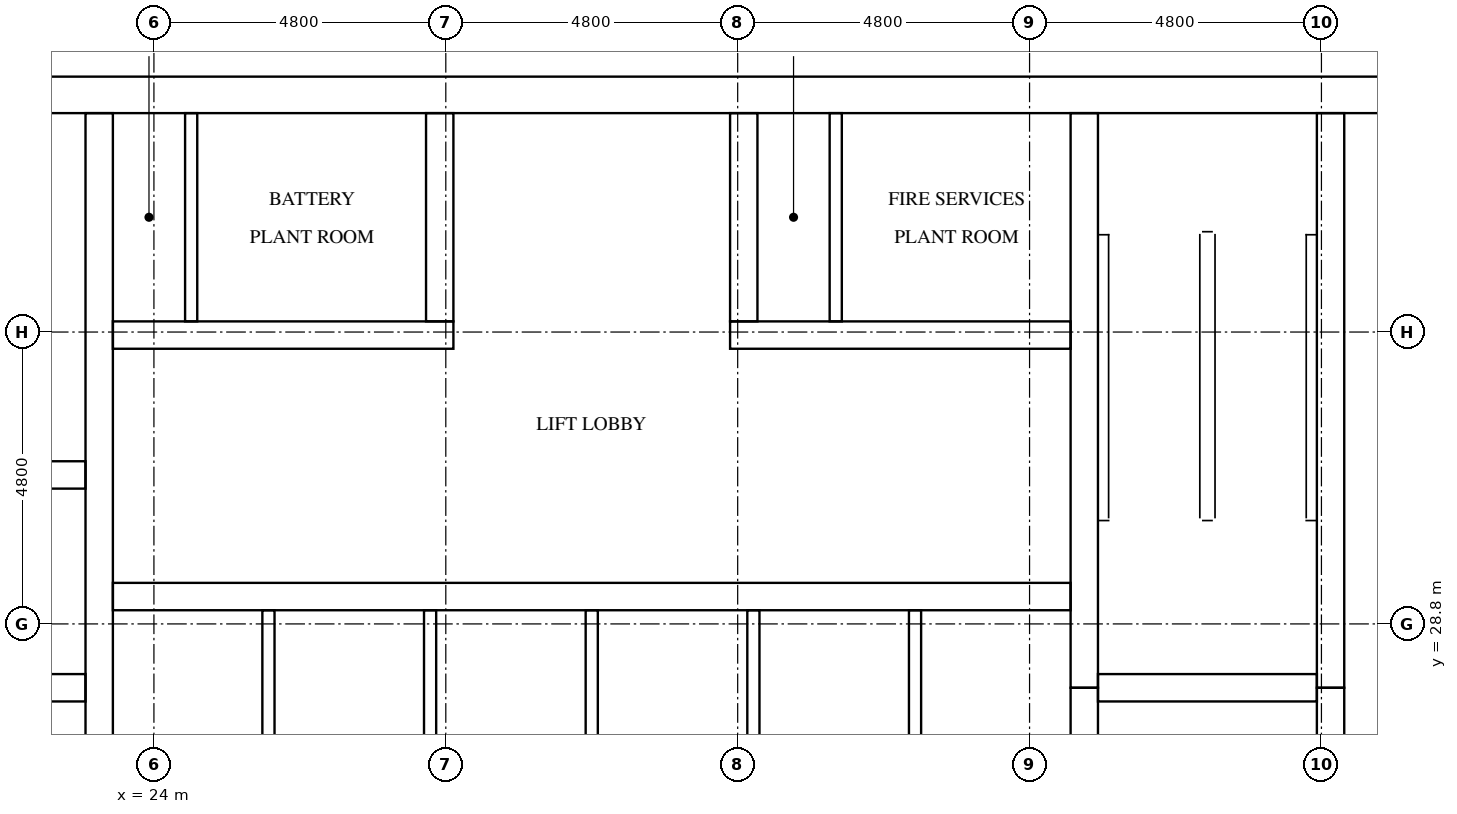
"""IFC4 building model, lengths in metres.
Left out: names, types, materials, properties, quantities, classifications, styles, units other than length and angle.
Written with IfcOpenShell. Run it as: python <this file> out.ifc"""

import sys

from ifc_helpers import new_model, si_unit, direction, frame, frame_2d, origin, place, context, subcontext, project, spatial, rectangle, extrude, element, fill, save


model = new_model("IFC4")
c1 = context("Model", 3, precision=1e-05, world=origin(), true_north=direction((0.0, 1.0)))
c2 = subcontext(c1, "Body", "Model", "MODEL_VIEW")
j1 = project(units=[si_unit("LENGTHUNIT", "METRE"), si_unit("PLANEANGLEUNIT", "RADIAN")], contexts=[c1])
p1 = place(None, origin())
s1 = spatial("IfcSite", under=j1, at=p1, CompositionType="ELEMENT")
p2 = place(p1, origin())
s2 = spatial("IfcBuilding", under=s1, at=p2, CompositionType="ELEMENT")
p3 = place(p2, frame((0.0, 0.0, 233.3)))
s3 = spatial("IfcBuildingStorey", under=s2, at=p3, CompositionType="ELEMENT", Elevation=233.3)
p4 = place(p3, frame((15.0, 37.5, 0.0), z_axis=(0.0, 0.0, 1.0), x_axis=(1.0, 0.0, 0.0)))
e1 = element("IfcWall", 1, at=p4, inside=s3, PredefinedType="SHEAR", context=c2, shape_type="SweptSolid", body=[
    extrude(rectangle(XDim=32.4, YDim=0.6, at=frame_2d((16.2, 0.0))), origin(), (0.0, 0.0, 1.0), 5.1),
])
p5 = place(p4, frame((15.3, 0.0, 0.0)))
e2 = element("IfcOpeningElement", 2, at=p5, cuts=e1, PredefinedType="OPENING", context=c2, shape_type="SweptSolid", body=[
    extrude(rectangle(XDim=1.8, YDim=2.1, at=frame_2d((0.9, 1.05))), frame((0.0, 0.31, 0.0), z_axis=(0.0, -1.0, 0.0), x_axis=(1.0, 0.0, 0.0)), (0.0, 0.0, 1.0), 0.62),
])
p6 = place(p4, frame((1.25, 0.0, 0.0)))
e3 = element("IfcOpeningElement", 3, at=p6, cuts=e1, PredefinedType="OPENING", context=c2, shape_type="SweptSolid", body=[
    extrude(rectangle(XDim=1.0, YDim=2.1, at=frame_2d((0.5, 1.05))), frame((0.0, 0.31, 0.0), z_axis=(0.0, -1.0, 0.0), x_axis=(1.0, 0.0, 0.0)), (0.0, 0.0, 1.0), 0.62),
])
p7 = place(p4, frame((4.988, 0.0, 0.0)))
e4 = element("IfcOpeningElement", 4, at=p7, cuts=e1, PredefinedType="OPENING", context=c2, shape_type="SweptSolid", body=[
    extrude(rectangle(XDim=1.0, YDim=2.1, at=frame_2d((0.5, 1.05))), frame((0.0, 0.31, 0.0), z_axis=(0.0, -1.0, 0.0), x_axis=(1.0, 0.0, 0.0)), (0.0, 0.0, 1.0), 0.62),
])
p8 = place(p3, frame((23.1, 15.6, 0.0), z_axis=(0.0, 0.0, 1.0), x_axis=(0.0, 1.0, 0.0)))
e5 = element("IfcWall", 5, at=p8, inside=s3, PredefinedType="SHEAR", context=c2, shape_type="SweptSolid", body=[
    extrude(rectangle(XDim=21.6, YDim=0.45, at=frame_2d((10.8, 0.0))), origin(), (0.0, 0.0, 1.0), 5.1),
])
p9 = place(p3, frame((39.3, 24.25, 0.0), z_axis=(0.0, 0.0, 1.0), x_axis=(0.0, 1.0, 0.0)))
e6 = element("IfcWall", 6, at=p9, inside=s3, PredefinedType="SHEAR", context=c2, shape_type="SweptSolid", body=[
    extrude(rectangle(XDim=3.5, YDim=0.45, at=frame_2d((1.75, 0.0))), origin(), (0.0, 0.0, 1.0), 5.1),
])
p10 = place(p3, frame((39.3, 27.75, 0.0), z_axis=(0.0, 0.0, 1.0), x_axis=(0.0, 1.0, 0.0)))
e7 = element("IfcWall", 7, at=p10, inside=s3, PredefinedType="SHEAR", context=c2, shape_type="SweptSolid", body=[
    extrude(rectangle(XDim=9.45, YDim=0.45, at=frame_2d((4.725, 0.0))), origin(), (0.0, 0.0, 1.0), 5.1),
])
p11 = place(p3, frame((43.35, 24.25, 0.0), z_axis=(0.0, 0.0, 1.0), x_axis=(0.0, 1.0, 0.0)))
e8 = element("IfcWall", 8, at=p11, inside=s3, PredefinedType="SHEAR", context=c2, shape_type="SweptSolid", body=[
    extrude(rectangle(XDim=3.5, YDim=0.45, at=frame_2d((1.75, 0.0))), origin(), (0.0, 0.0, 1.0), 5.1),
])
p12 = place(p11, frame((1.2, 0.0, 0.0)))
e9 = element("IfcOpeningElement", 9, at=p12, cuts=e8, PredefinedType="OPENING", context=c2, shape_type="SweptSolid", body=[
    extrude(rectangle(XDim=1.1, YDim=2.1, at=frame_2d((0.55, 1.05))), frame((0.0, 0.235, 0.0), z_axis=(0.0, -1.0, 0.0), x_axis=(1.0, 0.0, 0.0)), (0.0, 0.0, 1.0), 0.47),
])
p13 = place(p3, frame((43.35, 27.75, 0.0), z_axis=(0.0, 0.0, 1.0), x_axis=(0.0, 1.0, 0.0)))
e10 = element("IfcWall", 10, at=p13, inside=s3, PredefinedType="SHEAR", context=c2, shape_type="SweptSolid", body=[
    extrude(rectangle(XDim=9.45, YDim=0.45, at=frame_2d((4.725, 0.0))), origin(), (0.0, 0.0, 1.0), 5.1),
])
p14 = place(p13, frame((7.65, 0.0, 0.0)))
e11 = element("IfcOpeningElement", 11, at=p14, cuts=e10, PredefinedType="OPENING", context=c2, shape_type="SweptSolid", body=[
    extrude(rectangle(XDim=1.2, YDim=2.1, at=frame_2d((0.6, 1.05))), frame((0.0, 0.235, 0.0), z_axis=(0.0, -1.0, 0.0), x_axis=(1.0, 0.0, 0.0)), (0.0, 0.0, 1.0), 0.47),
])
p15 = place(p3, frame((19.275, 27.75, 0.0), z_axis=(0.0, 0.0, 1.0), x_axis=(1.0, 0.0, 0.0)))
e12 = element("IfcWall", 12, at=p15, inside=s3, PredefinedType="SHEAR", context=c2, shape_type="SweptSolid", body=[
    extrude(rectangle(XDim=3.6, YDim=0.45, at=frame_2d((1.8, 0.0))), origin(), (0.0, 0.0, 1.0), 5.1),
])
p16 = place(p3, frame((15.6, 31.25, 0.0), z_axis=(0.0, 0.0, 1.0), x_axis=(1.0, 0.0, 0.0)))
e13 = element("IfcWall", 13, at=p16, inside=s3, PredefinedType="SHEAR", context=c2, shape_type="SweptSolid", body=[
    extrude(rectangle(XDim=7.275, YDim=0.45, at=frame_2d((3.637, 0.0))), origin(), (0.0, 0.0, 1.0), 5.1),
])
p17 = place(p3, frame((39.525, 27.75, 0.0), z_axis=(0.0, 0.0, 1.0), x_axis=(1.0, 0.0, 0.0)))
e14 = element("IfcWall", 14, at=p17, inside=s3, PredefinedType="SHEAR", context=c2, shape_type="SweptSolid", body=[
    extrude(rectangle(XDim=3.6, YDim=0.45, at=frame_2d((1.8, 0.0))), origin(), (0.0, 0.0, 1.0), 5.1),
])
p18 = place(p3, frame((23.325, 29.25, 0.0), z_axis=(0.0, 0.0, 1.0), x_axis=(1.0, 0.0, 0.0)))
e15 = element("IfcWall", 15, at=p18, inside=s3, PredefinedType="SHEAR", context=c2, shape_type="SweptSolid", body=[
    extrude(rectangle(XDim=15.75, YDim=0.45, at=frame_2d((7.875, 0.0))), origin(), (0.0, 0.0, 1.0), 5.1),
])
p19 = place(p18, frame((0.679, 0.0, 0.0)))
e16 = element("IfcOpeningElement", 16, at=p19, cuts=e15, PredefinedType="OPENING", context=c2, shape_type="SweptSolid", body=[
    extrude(rectangle(XDim=1.1, YDim=2.1, at=frame_2d((0.55, 1.05))), frame((0.0, 0.235, 0.0), z_axis=(0.0, -1.0, 0.0), x_axis=(1.0, 0.0, 0.0)), (0.0, 0.0, 1.0), 0.47),
])
p20 = place(p18, frame((3.337, 0.0, 0.0)))
e17 = element("IfcOpeningElement", 17, at=p20, cuts=e15, PredefinedType="OPENING", context=c2, shape_type="SweptSolid", body=[
    extrude(rectangle(XDim=1.1, YDim=2.1, at=frame_2d((0.55, 1.05))), frame((0.0, 0.235, 0.0), z_axis=(0.0, -1.0, 0.0), x_axis=(1.0, 0.0, 0.0)), (0.0, 0.0, 1.0), 0.47),
])
p21 = place(p18, frame((5.996, 0.0, 0.0)))
e18 = element("IfcOpeningElement", 18, at=p21, cuts=e15, PredefinedType="OPENING", context=c2, shape_type="SweptSolid", body=[
    extrude(rectangle(XDim=1.1, YDim=2.1, at=frame_2d((0.55, 1.05))), frame((0.0, 0.235, 0.0), z_axis=(0.0, -1.0, 0.0), x_axis=(1.0, 0.0, 0.0)), (0.0, 0.0, 1.0), 0.47),
])
p22 = place(p18, frame((8.654, 0.0, 0.0)))
e19 = element("IfcOpeningElement", 19, at=p22, cuts=e15, PredefinedType="OPENING", context=c2, shape_type="SweptSolid", body=[
    extrude(rectangle(XDim=1.1, YDim=2.1, at=frame_2d((0.55, 1.05))), frame((0.0, 0.235, 0.0), z_axis=(0.0, -1.0, 0.0), x_axis=(1.0, 0.0, 0.0)), (0.0, 0.0, 1.0), 0.47),
])
p23 = place(p18, frame((11.312, 0.0, 0.0)))
e20 = element("IfcOpeningElement", 20, at=p23, cuts=e15, PredefinedType="OPENING", context=c2, shape_type="SweptSolid", body=[
    extrude(rectangle(XDim=1.1, YDim=2.1, at=frame_2d((0.55, 1.05))), frame((0.0, 0.235, 0.0), z_axis=(0.0, -1.0, 0.0), x_axis=(1.0, 0.0, 0.0)), (0.0, 0.0, 1.0), 0.47),
])
p24 = place(p18, frame((13.971, 0.0, 0.0)))
e21 = element("IfcOpeningElement", 21, at=p24, cuts=e15, PredefinedType="OPENING", context=c2, shape_type="SweptSolid", body=[
    extrude(rectangle(XDim=1.1, YDim=2.1, at=frame_2d((0.55, 1.05))), frame((0.0, 0.235, 0.0), z_axis=(0.0, -1.0, 0.0), x_axis=(1.0, 0.0, 0.0)), (0.0, 0.0, 1.0), 0.47),
])
p25 = place(p3, frame((23.325, 33.55, 0.0), z_axis=(0.0, 0.0, 1.0), x_axis=(1.0, 0.0, 0.0)))
e22 = element("IfcWall", 22, at=p25, inside=s3, PredefinedType="SHEAR", context=c2, shape_type="SweptSolid", body=[
    extrude(rectangle(XDim=5.6, YDim=0.45, at=frame_2d((2.8, 0.0))), origin(), (0.0, 0.0, 1.0), 5.1),
])
p26 = place(p25, frame((0.094, 0.0, 0.0)))
e23 = element("IfcOpeningElement", 23, at=p26, cuts=e22, PredefinedType="OPENING", context=c2, shape_type="SweptSolid", body=[
    extrude(rectangle(XDim=1.0, YDim=2.1, at=frame_2d((0.5, 1.05))), frame((0.0, 0.235, 0.0), z_axis=(0.0, -1.0, 0.0), x_axis=(1.0, 0.0, 0.0)), (0.0, 0.0, 1.0), 0.47),
])
p27 = place(p25, frame((2.769, 0.0, 0.0)))
e24 = element("IfcOpeningElement", 24, at=p27, cuts=e22, PredefinedType="OPENING", context=c2, shape_type="SweptSolid", body=[
    extrude(rectangle(XDim=1.0, YDim=2.1, at=frame_2d((0.5, 1.05))), frame((0.0, 0.235, 0.0), z_axis=(0.0, -1.0, 0.0), x_axis=(1.0, 0.0, 0.0)), (0.0, 0.0, 1.0), 0.47),
])
p28 = place(p3, frame((33.475, 33.55, 0.0), z_axis=(0.0, 0.0, 1.0), x_axis=(1.0, 0.0, 0.0)))
e25 = element("IfcWall", 25, at=p28, inside=s3, PredefinedType="SHEAR", context=c2, shape_type="SweptSolid", body=[
    extrude(rectangle(XDim=5.6, YDim=0.45, at=frame_2d((2.8, 0.0))), origin(), (0.0, 0.0, 1.0), 5.1),
])
p29 = place(p28, frame((0.544, 0.0, 0.0)))
e26 = element("IfcOpeningElement", 26, at=p29, cuts=e25, PredefinedType="OPENING", context=c2, shape_type="SweptSolid", body=[
    extrude(rectangle(XDim=1.0, YDim=2.1, at=frame_2d((0.5, 1.05))), frame((0.0, 0.235, 0.0), z_axis=(0.0, -1.0, 0.0), x_axis=(1.0, 0.0, 0.0)), (0.0, 0.0, 1.0), 0.47),
])
p30 = place(p28, frame((3.219, 0.0, 0.0)))
e27 = element("IfcOpeningElement", 27, at=p30, cuts=e25, PredefinedType="OPENING", context=c2, shape_type="SweptSolid", body=[
    extrude(rectangle(XDim=1.0, YDim=2.1, at=frame_2d((0.5, 1.05))), frame((0.0, 0.235, 0.0), z_axis=(0.0, -1.0, 0.0), x_axis=(1.0, 0.0, 0.0)), (0.0, 0.0, 1.0), 0.47),
])
for number, where, z_axis, x_axis in (
    (28, (28.7, 33.775, 0.0), (0.0, 0.0, 1.0), (0.0, 1.0, 0.0)),
    (29, (33.7, 33.775, 0.0), (0.0, 0.0, 1.0), (0.0, 1.0, 0.0)),
):
    element("IfcWall", number, at=place(p3, frame(where, z_axis=z_axis, x_axis=x_axis)), inside=s3, PredefinedType="SHEAR", context=c2, shape_type="SweptSolid", body=[
        extrude(rectangle(XDim=3.425, YDim=0.45, at=frame_2d((1.712, 0.0))), origin(), (0.0, 0.0, 1.0), 5.1),
    ])
for number, where, z_axis, x_axis in (
    (30, (25.883, 26.375, 0.0), (0.0, 0.0, 1.0), (0.0, 1.0, 0.0)),
    (31, (28.542, 26.375, 0.0), (0.0, 0.0, 1.0), (0.0, 1.0, 0.0)),
    (32, (31.2, 26.375, 0.0), (0.0, 0.0, 1.0), (0.0, 1.0, 0.0)),
    (33, (33.858, 26.375, 0.0), (0.0, 0.0, 1.0), (0.0, 1.0, 0.0)),
    (34, (36.517, 26.375, 0.0), (0.0, 0.0, 1.0), (0.0, 1.0, 0.0)),
):
    element("IfcWall", number, at=place(p3, frame(where, z_axis=z_axis, x_axis=x_axis)), inside=s3, PredefinedType="SOLIDWALL", context=c2, shape_type="SweptSolid", body=[
        extrude(rectangle(XDim=2.65, YDim=0.2, at=frame_2d((1.325, 0.0))), origin(), (0.0, 0.0, 1.0), 5.1),
    ])
for number, where, z_axis, x_axis in (
    (35, (24.613, 33.775, 0.0), (0.0, 0.0, 1.0), (0.0, 1.0, 0.0)),
    (36, (35.212, 33.775, 0.0), (0.0, 0.0, 1.0), (0.0, 1.0, 0.0)),
):
    element("IfcWall", number, at=place(p3, frame(where, z_axis=z_axis, x_axis=x_axis)), inside=s3, PredefinedType="PARTITIONING", context=c2, shape_type="SweptSolid", body=[
        extrude(rectangle(XDim=3.425, YDim=0.2, at=frame_2d((1.712, 0.0))), origin(), (0.0, 0.0, 1.0), 5.1),
    ])
p31 = place(p19, origin())
e37 = element("IfcDoor", 37, at=p31, inside=s3, OperationType="DOUBLE_DOOR_SLIDING", PredefinedType="DOOR", context=c2, shape_type="SweptSolid", body=[
    extrude(rectangle(XDim=1.1, YDim=2.1, at=frame_2d((0.55, 1.05))), frame((0.0, 0.025, 0.0), z_axis=(0.0, -1.0, 0.0), x_axis=(1.0, 0.0, 0.0)), (0.0, 0.0, 1.0), 0.05),
])
fill(e16, e37)
p32 = place(p20, origin())
e38 = element("IfcDoor", 38, at=p32, inside=s3, OperationType="DOUBLE_DOOR_SLIDING", PredefinedType="DOOR", context=c2, shape_type="SweptSolid", body=[
    extrude(rectangle(XDim=1.1, YDim=2.1, at=frame_2d((0.55, 1.05))), frame((0.0, 0.025, 0.0), z_axis=(0.0, -1.0, 0.0), x_axis=(1.0, 0.0, 0.0)), (0.0, 0.0, 1.0), 0.05),
])
fill(e17, e38)
p33 = place(p21, origin())
e39 = element("IfcDoor", 39, at=p33, inside=s3, OperationType="DOUBLE_DOOR_SLIDING", PredefinedType="DOOR", context=c2, shape_type="SweptSolid", body=[
    extrude(rectangle(XDim=1.1, YDim=2.1, at=frame_2d((0.55, 1.05))), frame((0.0, 0.025, 0.0), z_axis=(0.0, -1.0, 0.0), x_axis=(1.0, 0.0, 0.0)), (0.0, 0.0, 1.0), 0.05),
])
fill(e18, e39)
p34 = place(p22, origin())
e40 = element("IfcDoor", 40, at=p34, inside=s3, OperationType="DOUBLE_DOOR_SLIDING", PredefinedType="DOOR", context=c2, shape_type="SweptSolid", body=[
    extrude(rectangle(XDim=1.1, YDim=2.1, at=frame_2d((0.55, 1.05))), frame((0.0, 0.025, 0.0), z_axis=(0.0, -1.0, 0.0), x_axis=(1.0, 0.0, 0.0)), (0.0, 0.0, 1.0), 0.05),
])
fill(e19, e40)
p35 = place(p23, origin())
e41 = element("IfcDoor", 41, at=p35, inside=s3, OperationType="DOUBLE_DOOR_SLIDING", PredefinedType="DOOR", context=c2, shape_type="SweptSolid", body=[
    extrude(rectangle(XDim=1.1, YDim=2.1, at=frame_2d((0.55, 1.05))), frame((0.0, 0.025, 0.0), z_axis=(0.0, -1.0, 0.0), x_axis=(1.0, 0.0, 0.0)), (0.0, 0.0, 1.0), 0.05),
])
fill(e20, e41)
p36 = place(p24, origin())
e42 = element("IfcDoor", 42, at=p36, inside=s3, OperationType="DOUBLE_DOOR_SLIDING", PredefinedType="DOOR", context=c2, shape_type="SweptSolid", body=[
    extrude(rectangle(XDim=1.1, YDim=2.1, at=frame_2d((0.55, 1.05))), frame((0.0, 0.025, 0.0), z_axis=(0.0, -1.0, 0.0), x_axis=(1.0, 0.0, 0.0)), (0.0, 0.0, 1.0), 0.05),
])
fill(e21, e42)
p37 = place(p14, origin())
e43 = element("IfcDoor", 43, at=p37, inside=s3, OperationType="SINGLE_SWING_LEFT", PredefinedType="DOOR", context=c2, shape_type="SweptSolid", body=[
    extrude(rectangle(XDim=1.2, YDim=2.1, at=frame_2d((0.6, 1.05))), frame((0.0, 0.025, 0.0), z_axis=(0.0, -1.0, 0.0), x_axis=(1.0, 0.0, 0.0)), (0.0, 0.0, 1.0), 0.05),
])
fill(e11, e43)
p38 = place(p5, origin())
e44 = element("IfcDoor", 44, at=p38, inside=s3, OperationType="DOUBLE_DOOR_SINGLE_SWING", PredefinedType="DOOR", context=c2, shape_type="SweptSolid", body=[
    extrude(rectangle(XDim=1.8, YDim=2.1, at=frame_2d((0.9, 1.05))), frame((0.0, 0.025, 0.0), z_axis=(0.0, -1.0, 0.0), x_axis=(1.0, 0.0, 0.0)), (0.0, 0.0, 1.0), 0.05),
])
fill(e2, e44)
p39 = place(p26, frame((1.0, 0.0, 0.0), z_axis=(0.0, 0.0, 1.0), x_axis=(-1.0, 0.0, 0.0)))
e45 = element("IfcDoor", 45, at=p39, inside=s3, OperationType="SINGLE_SWING_RIGHT", PredefinedType="DOOR", context=c2, shape_type="SweptSolid", body=[
    extrude(rectangle(XDim=1.0, YDim=2.1, at=frame_2d((0.5, 1.05))), frame((0.0, 0.025, 0.0), z_axis=(0.0, -1.0, 0.0), x_axis=(1.0, 0.0, 0.0)), (0.0, 0.0, 1.0), 0.05),
])
fill(e23, e45)
p40 = place(p27, frame((1.0, 0.0, 0.0), z_axis=(0.0, 0.0, 1.0), x_axis=(-1.0, 0.0, 0.0)))
e46 = element("IfcDoor", 46, at=p40, inside=s3, OperationType="SINGLE_SWING_LEFT", PredefinedType="DOOR", context=c2, shape_type="SweptSolid", body=[
    extrude(rectangle(XDim=1.0, YDim=2.1, at=frame_2d((0.5, 1.05))), frame((0.0, 0.025, 0.0), z_axis=(0.0, -1.0, 0.0), x_axis=(1.0, 0.0, 0.0)), (0.0, 0.0, 1.0), 0.05),
])
fill(e24, e46)
p41 = place(p29, frame((1.0, 0.0, 0.0), z_axis=(0.0, 0.0, 1.0), x_axis=(-1.0, 0.0, 0.0)))
e47 = element("IfcDoor", 47, at=p41, inside=s3, OperationType="SINGLE_SWING_RIGHT", PredefinedType="DOOR", context=c2, shape_type="SweptSolid", body=[
    extrude(rectangle(XDim=1.0, YDim=2.1, at=frame_2d((0.5, 1.05))), frame((0.0, 0.025, 0.0), z_axis=(0.0, -1.0, 0.0), x_axis=(1.0, 0.0, 0.0)), (0.0, 0.0, 1.0), 0.05),
])
fill(e26, e47)
p42 = place(p30, frame((1.0, 0.0, 0.0), z_axis=(0.0, 0.0, 1.0), x_axis=(-1.0, 0.0, 0.0)))
e48 = element("IfcDoor", 48, at=p42, inside=s3, OperationType="SINGLE_SWING_LEFT", PredefinedType="DOOR", context=c2, shape_type="SweptSolid", body=[
    extrude(rectangle(XDim=1.0, YDim=2.1, at=frame_2d((0.5, 1.05))), frame((0.0, 0.025, 0.0), z_axis=(0.0, -1.0, 0.0), x_axis=(1.0, 0.0, 0.0)), (0.0, 0.0, 1.0), 0.05),
])
fill(e27, e48)
save(model, sys.argv[1])
